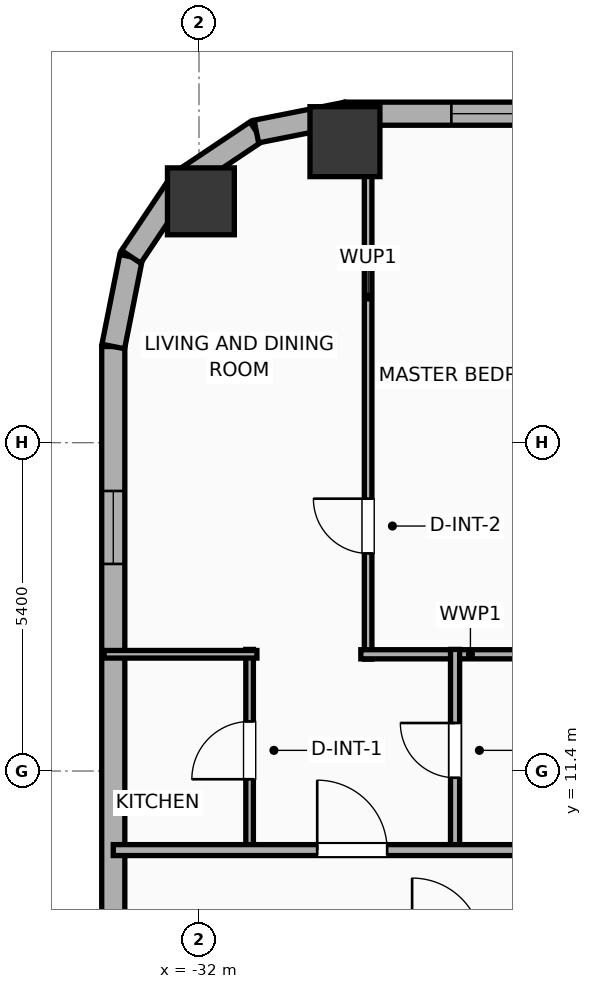
"""IFC4 building model, lengths in metres.
Left out: names, types, materials, properties, quantities, classifications, styles, units other than length and angle.
Written with IfcOpenShell. Run it as: python <this file> out.ifc"""

import sys

from ifc_helpers import new_model, si_unit, direction, frame, frame_2d, origin, origin_2d, place, context, subcontext, project, spatial, rectangle, hollow_rectangle, hollow_circle, extrude, element, fill, save


model = new_model("IFC4")
c1 = context("Model", 3, precision=1e-05, world=origin(), true_north=direction((0.0, 1.0)))
c2 = subcontext(c1, "Body", "Model", "MODEL_VIEW")
j1 = project(units=[si_unit("LENGTHUNIT", "METRE"), si_unit("PLANEANGLEUNIT", "RADIAN")], contexts=[c1])
p1 = place(None, origin())
s1 = spatial("IfcSite", under=j1, at=p1, CompositionType="ELEMENT")
p2 = place(p1, origin())
s2 = spatial("IfcBuilding", under=s1, at=p2, CompositionType="ELEMENT")
p3 = place(p2, frame((0.0, 0.0, 41.6)))
s3 = spatial("IfcBuildingStorey", under=s2, at=p3, CompositionType="ELEMENT", Elevation=41.6)
p4 = place(p3, frame((-29.6, 21.75, 0.0), z_axis=(0.0, 0.0, 1.0), x_axis=(1.0, 0.0, 0.0)))
e1 = element("IfcColumn", 1, at=p4, inside=s3, PredefinedType="COLUMN", context=c2, shape_type="SweptSolid", body=[
    extrude(hollow_rectangle(XDim=1.15, YDim=1.15, WallThickness=0.04, at=origin_2d()), origin(), (0.0, 0.0, 1.0), 3.9),
])
p5 = place(p3, frame((-31.969, 20.769, 0.0), z_axis=(0.0, 0.0, 1.0), x_axis=(1.0, 0.0, 0.0)))
e2 = element("IfcColumn", 2, at=p5, inside=s3, PredefinedType="COLUMN", context=c2, shape_type="SweptSolid", body=[
    extrude(hollow_circle(Radius=0.55, WallThickness=0.036, at=origin_2d()), origin(), (0.0, 0.0, 1.0), 3.9),
])
p6 = place(p3, frame((-33.41, -18.381, 0.0), z_axis=(0.0, 0.0, 1.0), x_axis=(0.0, 1.0, 0.0)))
e3 = element("IfcWall", 3, at=p6, inside=s3, PredefinedType="ELEMENTEDWALL", context=c2, shape_type="SweptSolid", body=[
    extrude(rectangle(XDim=36.763, YDim=0.38, at=frame_2d((18.381, 0.0))), origin(), (0.0, 0.0, 1.0), 3.65),
])
p7 = place(p6, frame((33.187, 0.0, 0.75)))
e4 = element("IfcOpeningElement", 4, at=p7, cuts=e3, PredefinedType="OPENING", context=c2, shape_type="SweptSolid", body=[
    extrude(rectangle(XDim=1.2, YDim=2.05, at=frame_2d((0.6, 1.025))), frame((0.0, 0.2, 0.0), z_axis=(0.0, -1.0, 0.0), x_axis=(1.0, 0.0, 0.0)), (0.0, 0.0, 1.0), 0.4),
])
p8 = place(p6, frame((22.126, 0.0, 0.75)))
e5 = element("IfcOpeningElement", 5, at=p8, cuts=e3, PredefinedType="OPENING", context=c2, shape_type="SweptSolid", body=[
    extrude(rectangle(XDim=1.2, YDim=2.05, at=frame_2d((0.6, 1.025))), frame((0.0, 0.2, 0.0), z_axis=(0.0, -1.0, 0.0), x_axis=(1.0, 0.0, 0.0)), (0.0, 0.0, 1.0), 0.4),
])
p9 = place(p6, frame((13.576, 0.0, 0.75)))
e6 = element("IfcOpeningElement", 6, at=p9, cuts=e3, PredefinedType="OPENING", context=c2, shape_type="SweptSolid", body=[
    extrude(rectangle(XDim=1.2, YDim=2.05, at=frame_2d((0.6, 1.025))), frame((0.0, 0.2, 0.0), z_axis=(0.0, -1.0, 0.0), x_axis=(1.0, 0.0, 0.0)), (0.0, 0.0, 1.0), 0.4),
])
p10 = place(p3, frame((-33.41, 18.381, 0.0), z_axis=(0.0, 0.0, 1.0), x_axis=(0.195086038585, 0.980786132421, 0.0)))
e7 = element("IfcWall", 7, at=p10, inside=s3, PredefinedType="ELEMENTEDWALL", context=c2, shape_type="SweptSolid", body=[
    extrude(rectangle(XDim=1.504, YDim=0.38, at=frame_2d((0.752, 0.0))), origin(), (0.0, 0.0, 1.0), 3.65),
])
p11 = place(p3, frame((-33.116, 19.857, 0.0), z_axis=(0.0, 0.0, 1.0), x_axis=(0.555572577804, 0.831468045563, 0.0)))
e8 = element("IfcWall", 8, at=p11, inside=s3, PredefinedType="ELEMENTEDWALL", context=c2, shape_type="SweptSolid", body=[
    extrude(rectangle(XDim=1.485, YDim=0.38, at=frame_2d((0.742, 0.0))), origin(), (0.0, 0.0, 1.0), 3.65),
])
p12 = place(p3, frame((-32.292, 21.091, 0.0), z_axis=(0.0, 0.0, 1.0), x_axis=(0.831442848281, 0.555610286119, 0.0)))
e9 = element("IfcWall", 9, at=p12, inside=s3, PredefinedType="ELEMENTEDWALL", context=c2, shape_type="SweptSolid", body=[
    extrude(rectangle(XDim=1.485, YDim=0.38, at=frame_2d((0.743, 0.0))), origin(), (0.0, 0.0, 1.0), 3.65),
])
p13 = place(p3, frame((-31.057, 21.917, 0.0), z_axis=(0.0, 0.0, 1.0), x_axis=(0.980786132421, 0.195086038585, 0.0)))
e10 = element("IfcWall", 10, at=p13, inside=s3, PredefinedType="ELEMENTEDWALL", context=c2, shape_type="SweptSolid", body=[
    extrude(rectangle(XDim=1.504, YDim=0.38, at=frame_2d((0.752, 0.0))), origin(), (0.0, 0.0, 1.0), 3.65),
])
p14 = place(p3, frame((-29.581, 22.21, 0.0), z_axis=(0.0, 0.0, 1.0), x_axis=(1.0, 0.0, 0.0)))
e11 = element("IfcWall", 11, at=p14, inside=s3, PredefinedType="ELEMENTEDWALL", context=c2, shape_type="SweptSolid", body=[
    extrude(rectangle(XDim=51.963, YDim=0.38, at=frame_2d((25.981, 0.0))), origin(), (0.0, 0.0, 1.0), 3.65),
])
p15 = place(p14, frame((25.631, 0.0, 0.75)))
e12 = element("IfcOpeningElement", 12, at=p15, cuts=e11, PredefinedType="OPENING", context=c2, shape_type="SweptSolid", body=[
    extrude(rectangle(XDim=2.4, YDim=2.1, at=frame_2d((1.2, 1.05))), frame((0.0, 0.2, 0.0), z_axis=(0.0, -1.0, 0.0), x_axis=(1.0, 0.0, 0.0)), (0.0, 0.0, 1.0), 0.4),
])
p16 = place(p14, frame((42.952, 0.0, 0.75)))
e13 = element("IfcOpeningElement", 13, at=p16, cuts=e11, PredefinedType="OPENING", context=c2, shape_type="SweptSolid", body=[
    extrude(rectangle(XDim=2.4, YDim=2.1, at=frame_2d((1.2, 1.05))), frame((0.0, 0.2, 0.0), z_axis=(0.0, -1.0, 0.0), x_axis=(1.0, 0.0, 0.0)), (0.0, 0.0, 1.0), 0.4),
])
p17 = place(p14, frame((1.731, 0.0, 0.75)))
e14 = element("IfcOpeningElement", 14, at=p17, cuts=e11, PredefinedType="OPENING", context=c2, shape_type="SweptSolid", body=[
    extrude(rectangle(XDim=1.2, YDim=2.05, at=frame_2d((0.6, 1.025))), frame((0.0, 0.2, 0.0), z_axis=(0.0, -1.0, 0.0), x_axis=(1.0, 0.0, 0.0)), (0.0, 0.0, 1.0), 0.4),
])
p18 = place(p14, frame((5.272, 0.0, 0.75)))
e15 = element("IfcOpeningElement", 15, at=p18, cuts=e11, PredefinedType="OPENING", context=c2, shape_type="SweptSolid", body=[
    extrude(rectangle(XDim=1.2, YDim=2.05, at=frame_2d((0.6, 1.025))), frame((0.0, 0.2, 0.0), z_axis=(0.0, -1.0, 0.0), x_axis=(1.0, 0.0, 0.0)), (0.0, 0.0, 1.0), 0.4),
])
p19 = place(p14, frame((8.356, 0.0, 0.75)))
e16 = element("IfcOpeningElement", 16, at=p19, cuts=e11, PredefinedType="OPENING", context=c2, shape_type="SweptSolid", body=[
    extrude(rectangle(XDim=1.2, YDim=2.05, at=frame_2d((0.6, 1.025))), frame((0.0, 0.2, 0.0), z_axis=(0.0, -1.0, 0.0), x_axis=(1.0, 0.0, 0.0)), (0.0, 0.0, 1.0), 0.4),
])
p20 = place(p14, frame((15.632, 0.0, 0.75)))
e17 = element("IfcOpeningElement", 17, at=p20, cuts=e11, PredefinedType="OPENING", context=c2, shape_type="SweptSolid", body=[
    extrude(rectangle(XDim=1.2, YDim=2.05, at=frame_2d((0.6, 1.025))), frame((0.0, 0.2, 0.0), z_axis=(0.0, -1.0, 0.0), x_axis=(1.0, 0.0, 0.0)), (0.0, 0.0, 1.0), 0.4),
])
p21 = place(p14, frame((12.137, 0.0, 0.75)))
e18 = element("IfcOpeningElement", 18, at=p21, cuts=e11, PredefinedType="OPENING", context=c2, shape_type="SweptSolid", body=[
    extrude(rectangle(XDim=1.2, YDim=2.05, at=frame_2d((0.6, 1.025))), frame((0.0, 0.2, 0.0), z_axis=(0.0, -1.0, 0.0), x_axis=(1.0, 0.0, 0.0)), (0.0, 0.0, 1.0), 0.4),
])
p22 = place(p14, frame((18.756, 0.0, 0.75)))
e19 = element("IfcOpeningElement", 19, at=p22, cuts=e11, PredefinedType="OPENING", context=c2, shape_type="SweptSolid", body=[
    extrude(rectangle(XDim=1.2, YDim=2.05, at=frame_2d((0.6, 1.025))), frame((0.0, 0.2, 0.0), z_axis=(0.0, -1.0, 0.0), x_axis=(1.0, 0.0, 0.0)), (0.0, 0.0, 1.0), 0.4),
])
p23 = place(p14, frame((22.907, 0.0, 0.75)))
e20 = element("IfcOpeningElement", 20, at=p23, cuts=e11, PredefinedType="OPENING", context=c2, shape_type="SweptSolid", body=[
    extrude(rectangle(XDim=1.2, YDim=2.05, at=frame_2d((0.6, 1.025))), frame((0.0, 0.2, 0.0), z_axis=(0.0, -1.0, 0.0), x_axis=(1.0, 0.0, 0.0)), (0.0, 0.0, 1.0), 0.4),
])
p24 = place(p14, frame((36.381, 0.0, 0.75)))
e21 = element("IfcOpeningElement", 21, at=p24, cuts=e11, PredefinedType="OPENING", context=c2, shape_type="SweptSolid", body=[
    extrude(rectangle(XDim=1.2, YDim=2.05, at=frame_2d((0.6, 1.025))), frame((0.0, 0.2, 0.0), z_axis=(0.0, -1.0, 0.0), x_axis=(1.0, 0.0, 0.0)), (0.0, 0.0, 1.0), 0.4),
])
p25 = place(p14, frame((32.886, 0.0, 0.75)))
e22 = element("IfcOpeningElement", 22, at=p25, cuts=e11, PredefinedType="OPENING", context=c2, shape_type="SweptSolid", body=[
    extrude(rectangle(XDim=1.2, YDim=2.05, at=frame_2d((0.6, 1.025))), frame((0.0, 0.2, 0.0), z_axis=(0.0, -1.0, 0.0), x_axis=(1.0, 0.0, 0.0)), (0.0, 0.0, 1.0), 0.4),
])
p26 = place(p14, frame((39.556, 0.0, 0.75)))
e23 = element("IfcOpeningElement", 23, at=p26, cuts=e11, PredefinedType="OPENING", context=c2, shape_type="SweptSolid", body=[
    extrude(rectangle(XDim=1.2, YDim=2.05, at=frame_2d((0.6, 1.025))), frame((0.0, 0.2, 0.0), z_axis=(0.0, -1.0, 0.0), x_axis=(1.0, 0.0, 0.0)), (0.0, 0.0, 1.0), 0.4),
])
p27 = place(p14, frame((46.885, 0.0, 0.75)))
e24 = element("IfcOpeningElement", 24, at=p27, cuts=e11, PredefinedType="OPENING", context=c2, shape_type="SweptSolid", body=[
    extrude(rectangle(XDim=1.2, YDim=2.05, at=frame_2d((0.6, 1.025))), frame((0.0, 0.2, 0.0), z_axis=(0.0, -1.0, 0.0), x_axis=(1.0, 0.0, 0.0)), (0.0, 0.0, 1.0), 0.4),
])
p28 = place(p14, frame((49.531, 0.0, 0.75)))
e25 = element("IfcOpeningElement", 25, at=p28, cuts=e11, PredefinedType="OPENING", context=c2, shape_type="SweptSolid", body=[
    extrude(rectangle(XDim=1.2, YDim=2.05, at=frame_2d((0.6, 1.025))), frame((0.0, 0.2, 0.0), z_axis=(0.0, -1.0, 0.0), x_axis=(1.0, 0.0, 0.0)), (0.0, 0.0, 1.0), 0.4),
])
p29 = place(p3, frame((-29.219, 13.24, 0.0), z_axis=(0.0, 0.0, 1.0), x_axis=(0.0, 1.0, 0.0)))
e26 = element("IfcWall", 26, at=p29, inside=s3, PredefinedType="PARTITIONING", context=c2, shape_type="SweptSolid", body=[
    extrude(rectangle(XDim=9.12, YDim=0.125, at=frame_2d((4.56, 0.0))), origin(), (0.0, 0.0, 1.0), 3.65),
])
p30 = place(p29, frame((1.739, 0.0, 0.0)))
e27 = element("IfcOpeningElement", 27, at=p30, cuts=e26, PredefinedType="OPENING", context=c2, shape_type="SweptSolid", body=[
    extrude(rectangle(XDim=0.9, YDim=2.05, at=frame_2d((0.45, 1.025))), frame((0.0, 0.073, 0.0), z_axis=(0.0, -1.0, 0.0), x_axis=(1.0, 0.0, 0.0)), (0.0, 0.0, 1.0), 0.145),
])
p31 = place(p3, frame((-29.339, 13.32, 0.0), z_axis=(0.0, 0.0, 1.0), x_axis=(1.0, 0.0, 0.0)))
e28 = element("IfcWall", 28, at=p31, inside=s3, PredefinedType="PLUMBINGWALL", context=c2, shape_type="SweptSolid", body=[
    extrude(rectangle(XDim=3.605, YDim=0.15, at=frame_2d((1.803, 0.0))), origin(), (0.0, 0.0, 1.0), 3.65),
])
p32 = place(p3, frame((-31.168, 10.08, 0.0), z_axis=(0.0, 0.0, 1.0), x_axis=(0.0, 1.0, 0.0)))
e29 = element("IfcWall", 29, at=p32, inside=s3, PredefinedType="PARTITIONING", context=c2, shape_type="SweptSolid", body=[
    extrude(rectangle(XDim=3.32, YDim=0.125, at=frame_2d((1.66, 0.0))), origin(), (0.0, 0.0, 1.0), 3.65),
])
p33 = place(p32, frame((1.185, 0.0, 0.0)))
e30 = element("IfcOpeningElement", 30, at=p33, cuts=e29, PredefinedType="OPENING", context=c2, shape_type="SweptSolid", body=[
    extrude(rectangle(XDim=0.95, YDim=2.05, at=frame_2d((0.475, 1.025))), frame((0.0, 0.073, 0.0), z_axis=(0.0, -1.0, 0.0), x_axis=(1.0, 0.0, 0.0)), (0.0, 0.0, 1.0), 0.145),
])
p34 = place(p3, frame((-33.56, 13.32, 0.0), z_axis=(0.0, 0.0, 1.0), x_axis=(1.0, 0.0, 0.0)))
e31 = element("IfcWall", 31, at=p34, inside=s3, PredefinedType="PARTITIONING", context=c2, shape_type="SweptSolid", body=[
    extrude(rectangle(XDim=2.512, YDim=0.125, at=frame_2d((1.256, 0.0))), origin(), (0.0, 0.0, 1.0), 3.65),
])
p35 = place(p3, frame((-27.789, 10.08, 0.0), z_axis=(0.0, 0.0, 1.0), x_axis=(0.0, 1.0, 0.0)))
e32 = element("IfcWall", 32, at=p35, inside=s3, PredefinedType="PLUMBINGWALL", context=c2, shape_type="SweptSolid", body=[
    extrude(rectangle(XDim=3.32, YDim=0.15, at=frame_2d((1.66, 0.0))), origin(), (0.0, 0.0, 1.0), 3.65),
])
p36 = place(p35, frame((1.21, 0.0, 0.0)))
e33 = element("IfcOpeningElement", 33, at=p36, cuts=e32, PredefinedType="OPENING", context=c2, shape_type="SweptSolid", body=[
    extrude(rectangle(XDim=0.9, YDim=2.05, at=frame_2d((0.45, 1.025))), frame((0.0, 0.085, 0.0), z_axis=(0.0, -1.0, 0.0), x_axis=(1.0, 0.0, 0.0)), (0.0, 0.0, 1.0), 0.17),
])
p37 = place(p3, frame((-33.41, 10.1, 0.0), z_axis=(0.0, 0.0, 1.0), x_axis=(1.0, 0.0, 0.0)))
e34 = element("IfcWall", 34, at=p37, inside=s3, PredefinedType="PARTITIONING", context=c2, shape_type="SweptSolid", body=[
    extrude(rectangle(XDim=59.62, YDim=0.18, at=frame_2d((29.81, 0.0))), origin(), (0.0, 0.0, 1.0), 3.65),
])
p38 = place(p37, frame((3.354, 0.0, 0.0)))
e35 = element("IfcOpeningElement", 35, at=p38, cuts=e34, PredefinedType="OPENING", context=c2, shape_type="SweptSolid", body=[
    extrude(rectangle(XDim=1.15, YDim=2.05, at=frame_2d((0.575, 1.025))), frame((0.0, 0.1, 0.0), z_axis=(0.0, -1.0, 0.0), x_axis=(1.0, 0.0, 0.0)), (0.0, 0.0, 1.0), 0.2),
])
p39 = place(p37, frame((10.997, 0.0, 0.0)))
e36 = element("IfcOpeningElement", 36, at=p39, cuts=e34, PredefinedType="OPENING", context=c2, shape_type="SweptSolid", body=[
    extrude(rectangle(XDim=1.15, YDim=2.05, at=frame_2d((0.575, 1.025))), frame((0.0, 0.1, 0.0), z_axis=(0.0, -1.0, 0.0), x_axis=(1.0, 0.0, 0.0)), (0.0, 0.0, 1.0), 0.2),
])
p40 = place(p37, frame((20.232, 0.0, 0.0)))
e37 = element("IfcOpeningElement", 37, at=p40, cuts=e34, PredefinedType="OPENING", context=c2, shape_type="SweptSolid", body=[
    extrude(rectangle(XDim=1.15, YDim=2.05, at=frame_2d((0.575, 1.025))), frame((0.0, 0.1, 0.0), z_axis=(0.0, -1.0, 0.0), x_axis=(1.0, 0.0, 0.0)), (0.0, 0.0, 1.0), 0.2),
])
p41 = place(p37, frame((30.38, 0.0, 0.0)))
e38 = element("IfcOpeningElement", 38, at=p41, cuts=e34, PredefinedType="OPENING", context=c2, shape_type="SweptSolid", body=[
    extrude(rectangle(XDim=1.15, YDim=2.05, at=frame_2d((0.575, 1.025))), frame((0.0, 0.1, 0.0), z_axis=(0.0, -1.0, 0.0), x_axis=(1.0, 0.0, 0.0)), (0.0, 0.0, 1.0), 0.2),
])
p42 = place(p37, frame((40.998, 0.0, 0.0)))
e39 = element("IfcOpeningElement", 39, at=p42, cuts=e34, PredefinedType="OPENING", context=c2, shape_type="SweptSolid", body=[
    extrude(rectangle(XDim=1.15, YDim=2.05, at=frame_2d((0.575, 1.025))), frame((0.0, 0.1, 0.0), z_axis=(0.0, -1.0, 0.0), x_axis=(1.0, 0.0, 0.0)), (0.0, 0.0, 1.0), 0.2),
])
p43 = place(p37, frame((49.428, 0.0, 0.0)))
e40 = element("IfcOpeningElement", 40, at=p43, cuts=e34, PredefinedType="OPENING", context=c2, shape_type="SweptSolid", body=[
    extrude(rectangle(XDim=0.9, YDim=2.05, at=frame_2d((0.45, 1.025))), frame((0.0, 0.1, 0.0), z_axis=(0.0, -1.0, 0.0), x_axis=(1.0, 0.0, 0.0)), (0.0, 0.0, 1.0), 0.2),
])
p44 = place(p37, frame((56.07, 0.0, 0.0)))
e41 = element("IfcOpeningElement", 41, at=p44, cuts=e34, PredefinedType="OPENING", context=c2, shape_type="SweptSolid", body=[
    extrude(rectangle(XDim=0.9, YDim=2.05, at=frame_2d((0.45, 1.025))), frame((0.0, 0.1, 0.0), z_axis=(0.0, -1.0, 0.0), x_axis=(1.0, 0.0, 0.0)), (0.0, 0.0, 1.0), 0.2),
])
p45 = place(p7, origin())
e42 = element("IfcWindow", 42, at=p45, inside=s3, PartitioningType="SINGLE_PANEL", PredefinedType="WINDOW", context=c2, shape_type="SweptSolid", body=[
    extrude(rectangle(XDim=1.2, YDim=2.05, at=frame_2d((0.6, 1.025))), frame((0.0, 0.03, 0.0), z_axis=(0.0, -1.0, 0.0), x_axis=(1.0, 0.0, 0.0)), (0.0, 0.0, 1.0), 0.06),
])
fill(e4, e42)
p46 = place(p17, origin())
e43 = element("IfcWindow", 43, at=p46, inside=s3, PartitioningType="SINGLE_PANEL", PredefinedType="WINDOW", context=c2, shape_type="SweptSolid", body=[
    extrude(rectangle(XDim=1.2, YDim=2.05, at=frame_2d((0.6, 1.025))), frame((0.0, 0.03, 0.0), z_axis=(0.0, -1.0, 0.0), x_axis=(1.0, 0.0, 0.0)), (0.0, 0.0, 1.0), 0.06),
])
fill(e14, e43)
p47 = place(p30, origin())
e44 = element("IfcDoor", 44, at=p47, inside=s3, OperationType="SINGLE_SWING_RIGHT", PredefinedType="DOOR", context=c2, shape_type="SweptSolid", body=[
    extrude(rectangle(XDim=0.9, YDim=2.05, at=frame_2d((0.45, 1.025))), frame((0.0, 0.025, 0.0), z_axis=(0.0, -1.0, 0.0), x_axis=(1.0, 0.0, 0.0)), (0.0, 0.0, 1.0), 0.05),
])
fill(e27, e44)
p48 = place(p33, origin())
e45 = element("IfcDoor", 45, at=p48, inside=s3, OperationType="SINGLE_SWING_LEFT", PredefinedType="DOOR", context=c2, shape_type="SweptSolid", body=[
    extrude(rectangle(XDim=0.95, YDim=2.05, at=frame_2d((0.475, 1.025))), frame((0.0, 0.025, 0.0), z_axis=(0.0, -1.0, 0.0), x_axis=(1.0, 0.0, 0.0)), (0.0, 0.0, 1.0), 0.05),
])
fill(e30, e45)
p49 = place(p36, origin())
e46 = element("IfcDoor", 46, at=p49, inside=s3, OperationType="SINGLE_SWING_RIGHT", PredefinedType="DOOR", context=c2, shape_type="SweptSolid", body=[
    extrude(rectangle(XDim=0.9, YDim=2.05, at=frame_2d((0.45, 1.025))), frame((0.0, 0.025, 0.0), z_axis=(0.0, -1.0, 0.0), x_axis=(1.0, 0.0, 0.0)), (0.0, 0.0, 1.0), 0.05),
])
fill(e33, e46)
p50 = place(p38, origin())
e47 = element("IfcDoor", 47, at=p50, inside=s3, OperationType="SINGLE_SWING_LEFT", PredefinedType="DOOR", context=c2, shape_type="SweptSolid", body=[
    extrude(rectangle(XDim=1.15, YDim=2.05, at=frame_2d((0.575, 1.025))), frame((0.0, 0.025, 0.0), z_axis=(0.0, -1.0, 0.0), x_axis=(1.0, 0.0, 0.0)), (0.0, 0.0, 1.0), 0.05),
])
fill(e35, e47)
save(model, sys.argv[1])
